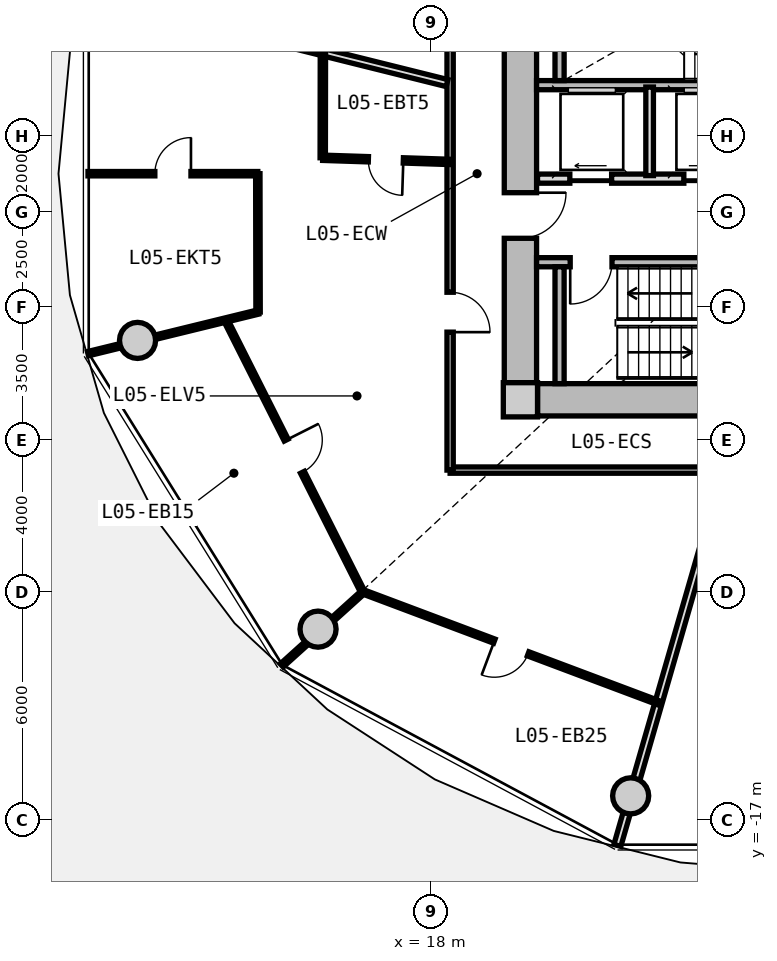
"""IFC4 building model, lengths in metres.
Left out: names, types, materials, properties, quantities, classifications, styles, units other than length and angle.
Written with IfcOpenShell. Run it as: python <this file> out.ifc"""

import sys

from ifc_helpers import new_model, si_unit, direction, frame, frame_2d, origin, origin_2d, place, context, subcontext, project, spatial, rectangle, circle, extrude, source, transform, mapped, element, fill, save


model = new_model("IFC4")
c1 = context("Model", 3, precision=1e-05, world=origin(), true_north=direction((0.0, 1.0)))
c2 = subcontext(c1, "Body", "Model", "MODEL_VIEW")
j1 = project(units=[si_unit("LENGTHUNIT", "METRE"), si_unit("PLANEANGLEUNIT", "RADIAN")], contexts=[c1])
p1 = place(None, origin())
s1 = spatial("IfcSite", under=j1, at=p1, CompositionType="ELEMENT")
p2 = place(p1, origin())
s2 = spatial("IfcBuilding", under=s1, at=p2, CompositionType="ELEMENT")
p3 = place(p2, frame((0.0, 0.0, 21.6)))
s3 = spatial("IfcBuildingStorey", under=s2, at=p3, CompositionType="ELEMENT", Elevation=21.6)
m1 = source(origin(), c2, "Body", "SweptSolid", [
    extrude(rectangle(XDim=0.9, YDim=0.9, at=origin_2d()), origin(), (0.0, 0.0, 1.0), 3.05),
])
p4 = place(p3, frame((20.35, -5.95, 0.0), z_axis=(0.0, 0.0, 1.0), x_axis=(1.0, 0.0, 0.0)))
e1 = element("IfcColumn", 1, at=p4, inside=s3, PredefinedType="COLUMN", context=c2, shape_type="MappedRepresentation", body=[
    mapped(m1, transform((0.0, 0.0, 0.0), x_axis=(1.0, 0.0, 0.0), y_axis=(0.0, 1.0, 0.0), z_axis=(0.0, 0.0, 1.0), scale=1.0)),
])
m2 = source(origin(), c2, "Body", "SweptSolid", [
    extrude(rectangle(XDim=14.4, YDim=0.85, at=frame_2d((7.2, 0.0))), origin(), (0.0, 0.0, 1.0), 2.79),
])
p5 = place(p3, frame((35.2, -5.95, 0.0), z_axis=(0.0, 0.0, 1.0), x_axis=(-1.0, 0.0, 0.0)))
e2 = element("IfcWall", 2, at=p5, inside=s3, PredefinedType="SHEAR", context=c2, shape_type="MappedRepresentation", body=[
    mapped(m2, transform((0.0, 0.0, 0.0), x_axis=(1.0, 0.0, 0.0), y_axis=(0.0, 1.0, 0.0), z_axis=(0.0, 0.0, 1.0), scale=1.0)),
])
m3 = source(origin(), c2, "Body", "SweptSolid", [
    extrude(rectangle(XDim=11.0, YDim=0.85, at=frame_2d((5.5, 0.0))), origin(), (0.0, 0.0, 1.0), 2.79),
])
p6 = place(p3, frame((20.35, -5.5, 0.0), z_axis=(0.0, 0.0, 1.0), x_axis=(0.0, 1.0, 0.0)))
e3 = element("IfcWall", 3, at=p6, inside=s3, PredefinedType="SHEAR", context=c2, shape_type="MappedRepresentation", body=[
    mapped(m3, transform((0.0, 0.0, 0.0), x_axis=(1.0, 0.0, 0.0), y_axis=(0.0, 1.0, 0.0), z_axis=(0.0, 0.0, 1.0), scale=1.0)),
])
p7 = place(p6, frame((3.8, 0.0, 0.0)))
e4 = element("IfcOpeningElement", 4, at=p7, cuts=e3, PredefinedType="OPENING", context=c2, shape_type="SweptSolid", body=[
    extrude(rectangle(XDim=1.2, YDim=2.15, at=frame_2d((0.6, 1.075))), frame((0.0, 0.435, 0.0), z_axis=(0.0, -1.0, 0.0), x_axis=(1.0, 0.0, 0.0)), (0.0, 0.0, 1.0), 0.87),
])
m4 = source(origin(), c2, "Body", "SweptSolid", [
    extrude(circle(Radius=0.475, at=origin_2d()), origin(), (0.0, 0.0, 1.0), 3.47),
])
for number, where, z_axis, x_axis in (
    (5, (10.275, -4.387, -0.42), (0.0, 0.0, 1.0), (1.0, 0.0, 0.0)),
    (6, (15.025, -11.985, -0.42), (0.0, 0.0, 1.0), (1.0, 0.0, 0.0)),
    (7, (23.251, -16.373, -0.42), (0.0, 0.0, 1.0), (1.0, 0.0, 0.0)),
):
    element("IfcColumn", number, at=place(p3, frame(where, z_axis=z_axis, x_axis=x_axis)), inside=s3, PredefinedType="COLUMN", context=c2, shape_type="MappedRepresentation", body=[
        mapped(m4, transform((0.0, 0.0, 0.0), x_axis=(1.0, 0.0, 0.0), y_axis=(0.0, 1.0, 0.0), z_axis=(0.0, 0.0, 1.0), scale=1.0)),
    ])
m5 = source(origin(), c2, "Body", "SweptSolid", [
    extrude(rectangle(XDim=7.765, YDim=0.24, at=frame_2d((3.883, 0.0))), origin(), (0.0, 0.0, 1.0), 2.79),
])
p8 = place(p3, frame((20.775, 2.33, 0.0), z_axis=(0.0, 0.0, 1.0), x_axis=(1.0, 0.0, 0.0)))
e8 = element("IfcWall", 8, at=p8, inside=s3, PredefinedType="PARTITIONING", context=c2, shape_type="MappedRepresentation", body=[
    mapped(m5, transform((0.0, 0.0, 0.0), x_axis=(1.0, 0.0, 0.0), y_axis=(0.0, 1.0, 0.0), z_axis=(0.0, 0.0, 1.0), scale=1.0)),
])
m6 = source(origin(), c2, "Body", "SweptSolid", [
    extrude(rectangle(XDim=3.075, YDim=0.24, at=frame_2d((1.538, 0.0))), origin(), (0.0, 0.0, 1.0), 2.79),
])
p9 = place(p3, frame((21.38, 2.45, 0.0), z_axis=(0.0, 0.0, 1.0), x_axis=(0.0, 1.0, 0.0)))
e9 = element("IfcWall", 9, at=p9, inside=s3, PredefinedType="PARTITIONING", context=c2, shape_type="MappedRepresentation", body=[
    mapped(m6, transform((0.0, 0.0, 0.0), x_axis=(1.0, 0.0, 0.0), y_axis=(0.0, 1.0, 0.0), z_axis=(0.0, 0.0, 1.0), scale=1.0)),
])
p10 = place(p3, frame((20.775, -2.33, 0.0), z_axis=(0.0, 0.0, 1.0), x_axis=(1.0, 0.0, 0.0)))
e10 = element("IfcWall", 10, at=p10, inside=s3, PredefinedType="PARTITIONING", context=c2, shape_type="MappedRepresentation", body=[
    mapped(m5, transform((0.0, 0.0, 0.0), x_axis=(1.0, 0.0, 0.0), y_axis=(0.0, 1.0, 0.0), z_axis=(0.0, 0.0, 1.0), scale=1.0)),
])
p11 = place(p10, frame((0.885, 0.0, 0.0)))
e11 = element("IfcOpeningElement", 11, at=p11, cuts=e10, PredefinedType="OPENING", context=c2, shape_type="SweptSolid", body=[
    extrude(rectangle(XDim=1.1, YDim=2.15, at=frame_2d((0.55, 1.075))), frame((0.0, 0.13, 0.0), z_axis=(0.0, -1.0, 0.0), x_axis=(1.0, 0.0, 0.0)), (0.0, 0.0, 1.0), 0.26),
])
p12 = place(p3, frame((21.38, -5.525, 0.0), z_axis=(0.0, 0.0, 1.0), x_axis=(0.0, 1.0, 0.0)))
e12 = element("IfcWall", 12, at=p12, inside=s3, PredefinedType="PARTITIONING", context=c2, shape_type="MappedRepresentation", body=[
    mapped(m6, transform((0.0, 0.0, 0.0), x_axis=(1.0, 0.0, 0.0), y_axis=(0.0, 1.0, 0.0), z_axis=(0.0, 0.0, 1.0), scale=1.0)),
])
m7 = source(origin(), c2, "Body", "SweptSolid", [
    extrude(rectangle(XDim=7.62, YDim=0.24, at=frame_2d((3.81, 0.0))), origin(), (0.0, 0.0, 1.0), 2.775),
])
p13 = place(p3, frame((20.8, -0.13, 0.0), z_axis=(0.0, 0.0, 1.0), x_axis=(1.0, 0.0, 0.0)))
e13 = element("IfcWall", 13, at=p13, inside=s3, PredefinedType="PARTITIONING", context=c2, shape_type="MappedRepresentation", body=[
    mapped(m7, transform((0.0, 0.0, 0.0), x_axis=(1.0, 0.0, 0.0), y_axis=(0.0, 1.0, 0.0), z_axis=(0.0, 0.0, 1.0), scale=1.0)),
])
p14 = place(p13, frame((6.22, 0.0, 0.0)))
e14 = element("IfcOpeningElement", 14, at=p14, cuts=e13, PredefinedType="OPENING", context=c2, shape_type="SweptSolid", body=[
    extrude(rectangle(XDim=1.0, YDim=2.1, at=frame_2d((0.5, 1.05))), frame((0.0, 0.13, 0.0), z_axis=(0.0, -1.0, 0.0), x_axis=(1.0, 0.0, 0.0)), (0.0, 0.0, 1.0), 0.26),
])
p15 = place(p13, frame((0.85, 0.0, 0.0)))
e15 = element("IfcOpeningElement", 15, at=p15, cuts=e13, PredefinedType="OPENING", context=c2, shape_type="SweptSolid", body=[
    extrude(rectangle(XDim=1.1, YDim=2.2, at=frame_2d((0.55, 1.1))), frame((0.0, 0.13, 0.0), z_axis=(0.0, -1.0, 0.0), x_axis=(1.0, 0.0, 0.0)), (0.0, 0.0, 1.0), 0.26),
])
p16 = place(p13, frame((3.85, 0.0, 0.0)))
e16 = element("IfcOpeningElement", 16, at=p16, cuts=e13, PredefinedType="OPENING", context=c2, shape_type="SweptSolid", body=[
    extrude(rectangle(XDim=1.1, YDim=2.2, at=frame_2d((0.55, 1.1))), frame((0.0, 0.13, 0.0), z_axis=(0.0, -1.0, 0.0), x_axis=(1.0, 0.0, 0.0)), (0.0, 0.0, 1.0), 0.26),
])
m8 = source(origin(), c2, "Body", "SweptSolid", [
    extrude(rectangle(XDim=2.33, YDim=0.2, at=frame_2d((1.165, 0.0))), origin(), (0.0, 0.0, 1.0), 2.775),
])
p17 = place(p3, frame((23.75, -0.05, 0.0), z_axis=(0.0, 0.0, 1.0), x_axis=(0.0, 1.0, 0.0)))
e17 = element("IfcWall", 17, at=p17, inside=s3, PredefinedType="PARTITIONING", context=c2, shape_type="MappedRepresentation", body=[
    mapped(m8, transform((0.0, 0.0, 0.0), x_axis=(1.0, 0.0, 0.0), y_axis=(0.0, 1.0, 0.0), z_axis=(0.0, 0.0, 1.0), scale=1.0)),
])
m9 = source(origin(), c2, "Body", "SweptSolid", [
    extrude(rectangle(XDim=19.0, YDim=0.165, at=frame_2d((9.5, 0.0))), origin(), (0.0, 0.0, 1.0), 2.775),
])
p18 = place(p3, frame((37.5, -7.8, 0.0), z_axis=(0.0, 0.0, 1.0), x_axis=(-1.0, 0.0, 0.0)))
e18 = element("IfcWall", 18, at=p18, inside=s3, PredefinedType="PARTITIONING", context=c2, shape_type="MappedRepresentation", body=[
    mapped(m9, transform((0.0, 0.0, 0.0), x_axis=(1.0, 0.0, 0.0), y_axis=(0.0, 1.0, 0.0), z_axis=(0.0, 0.0, 1.0), scale=1.0)),
])
p19 = place(p18, frame((8.875, 0.0, 0.0)))
e19 = element("IfcOpeningElement", 19, at=p19, cuts=e18, PredefinedType="OPENING", context=c2, shape_type="SweptSolid", body=[
    extrude(rectangle(XDim=1.25, YDim=2.2, at=frame_2d((0.625, 1.1))), frame((0.0, 0.093, 0.0), z_axis=(0.0, -1.0, 0.0), x_axis=(1.0, 0.0, 0.0)), (0.0, 0.0, 1.0), 0.185),
])
p20 = place(p18, frame((5.915, 0.0, 0.0)))
e20 = element("IfcOpeningElement", 20, at=p20, cuts=e18, PredefinedType="OPENING", context=c2, shape_type="SweptSolid", body=[
    extrude(rectangle(XDim=0.92, YDim=2.1, at=frame_2d((0.46, 1.05))), frame((0.0, 0.093, 0.0), z_axis=(0.0, -1.0, 0.0), x_axis=(1.0, 0.0, 0.0)), (0.0, 0.0, 1.0), 0.185),
])
p21 = place(p18, frame((2.769, 0.0, 0.0)))
e21 = element("IfcOpeningElement", 21, at=p21, cuts=e18, PredefinedType="OPENING", context=c2, shape_type="SweptSolid", body=[
    extrude(rectangle(XDim=0.92, YDim=2.1, at=frame_2d((0.46, 1.05))), frame((0.0, 0.093, 0.0), z_axis=(0.0, -1.0, 0.0), x_axis=(1.0, 0.0, 0.0)), (0.0, 0.0, 1.0), 0.185),
])
m10 = source(origin(), c2, "Body", "SweptSolid", [
    extrude(rectangle(XDim=15.6, YDim=0.165, at=frame_2d((7.8, 0.0))), origin(), (0.0, 0.0, 1.0), 2.775),
])
p22 = place(p3, frame((18.5, -7.8, 0.0), z_axis=(0.0, 0.0, 1.0), x_axis=(0.0, 1.0, 0.0)))
e22 = element("IfcWall", 22, at=p22, inside=s3, PredefinedType="PARTITIONING", context=c2, shape_type="MappedRepresentation", body=[
    mapped(m10, transform((0.0, 0.0, 0.0), x_axis=(1.0, 0.0, 0.0), y_axis=(0.0, 1.0, 0.0), z_axis=(0.0, 0.0, 1.0), scale=1.0)),
])
p23 = place(p22, frame((12.241, 0.0, 0.0)))
e23 = element("IfcOpeningElement", 23, at=p23, cuts=e22, PredefinedType="OPENING", context=c2, shape_type="SweptSolid", body=[
    extrude(rectangle(XDim=1.05, YDim=2.15, at=frame_2d((0.525, 1.075))), frame((0.0, 0.093, 0.0), z_axis=(0.0, -1.0, 0.0), x_axis=(1.0, 0.0, 0.0)), (0.0, 0.0, 1.0), 0.185),
])
p24 = place(p22, frame((3.63, 0.0, 0.0)))
e24 = element("IfcOpeningElement", 24, at=p24, cuts=e22, PredefinedType="OPENING", context=c2, shape_type="SweptSolid", body=[
    extrude(rectangle(XDim=1.05, YDim=2.15, at=frame_2d((0.525, 1.075))), frame((0.0, 0.093, 0.0), z_axis=(0.0, -1.0, 0.0), x_axis=(1.0, 0.0, 0.0)), (0.0, 0.0, 1.0), 0.185),
])
m11 = source(origin(), c2, "Body", "SweptSolid", [
    extrude(rectangle(XDim=9.737, YDim=0.19, at=frame_2d((4.869, 0.0))), origin(), (0.0, 0.0, 1.0), 2.225),
])
p25 = place(p3, frame((18.42, 2.385, 0.0), z_axis=(0.0, 0.0, 1.0), x_axis=(-0.970392716238, 0.241532557375, 0.0)))
e25 = element("IfcWall", 25, at=p25, inside=s3, PredefinedType="PARTITIONING", context=c2, shape_type="MappedRepresentation", body=[
    mapped(m11, transform((0.0, 0.0, 0.0), x_axis=(1.0, 0.0, 0.0), y_axis=(0.0, 1.0, 0.0), z_axis=(0.0, 0.0, 1.0), scale=1.0)),
])
m12 = source(origin(), c2, "Body", "SweptSolid", [
    extrude(rectangle(XDim=10.196, YDim=0.19, at=frame_2d((5.098, 0.0))), origin(), (0.0, 0.0, 1.0), 2.225),
])
p26 = place(p3, frame((25.727, -7.88, 0.0), z_axis=(0.0, 0.0, 1.0), x_axis=(-0.277136420347, -0.960830580549, 0.0)))
e26 = element("IfcWall", 26, at=p26, inside=s3, PredefinedType="PARTITIONING", context=c2, shape_type="MappedRepresentation", body=[
    mapped(m12, transform((0.0, 0.0, 0.0), x_axis=(1.0, 0.0, 0.0), y_axis=(0.0, 1.0, 0.0), z_axis=(0.0, 0.0, 1.0), scale=1.0)),
])
m13 = source(origin(), c2, "Body", "SweptSolid", [
    extrude(rectangle(XDim=8.018, YDim=0.115, at=frame_2d((4.009, 0.0))), origin(), (0.0, 0.0, 1.0), 2.775),
])
p27 = place(p3, frame((12.596, -3.854, 0.0), z_axis=(0.0, 0.0, 1.0), x_axis=(0.450134355233, -0.89296084026, 0.0)))
e27 = element("IfcWall", 27, at=p27, inside=s3, PredefinedType="PARTITIONING", context=c2, shape_type="MappedRepresentation", body=[
    mapped(m13, transform((0.0, 0.0, 0.0), x_axis=(1.0, 0.0, 0.0), y_axis=(0.0, 1.0, 0.0), z_axis=(0.0, 0.0, 1.0), scale=1.0)),
])
p28 = place(p27, frame((3.534, 0.0, 0.0)))
e28 = element("IfcOpeningElement", 28, at=p28, cuts=e27, PredefinedType="OPENING", context=c2, shape_type="SweptSolid", body=[
    extrude(rectangle(XDim=0.95, YDim=2.1, at=frame_2d((0.475, 1.05))), frame((0.0, 0.067, 0.0), z_axis=(0.0, -1.0, 0.0), x_axis=(1.0, 0.0, 0.0)), (0.0, 0.0, 1.0), 0.135),
])
m14 = source(origin(), c2, "Body", "SweptSolid", [
    extrude(rectangle(XDim=4.609, YDim=0.115, at=frame_2d((2.305, 0.0))), origin(), (0.0, 0.0, 1.0), 2.225),
])
p29 = place(p3, frame((13.448, -3.641, 0.0), z_axis=(0.0, 0.0, 1.0), x_axis=(-0.971345494518, -0.237671896276, 0.0)))
e29 = element("IfcWall", 29, at=p29, inside=s3, PredefinedType="PARTITIONING", context=c2, shape_type="MappedRepresentation", body=[
    mapped(m14, transform((0.0, 0.0, 0.0), x_axis=(1.0, 0.0, 0.0), y_axis=(0.0, 1.0, 0.0), z_axis=(0.0, 0.0, 1.0), scale=1.0)),
])
m15 = source(origin(), c2, "Body", "SweptSolid", [
    extrude(rectangle(XDim=8.32, YDim=0.115, at=frame_2d((4.16, 0.0))), origin(), (0.0, 0.0, 1.0), 2.775),
])
p30 = place(p3, frame((16.214, -11.006, 0.0), z_axis=(0.0, 0.0, 1.0), x_axis=(0.936180763098, -0.351518959382, 0.0)))
e30 = element("IfcWall", 30, at=p30, inside=s3, PredefinedType="PARTITIONING", context=c2, shape_type="MappedRepresentation", body=[
    mapped(m15, transform((0.0, 0.0, 0.0), x_axis=(1.0, 0.0, 0.0), y_axis=(0.0, 1.0, 0.0), z_axis=(0.0, 0.0, 1.0), scale=1.0)),
])
p31 = place(p30, frame((3.685, 0.0, 0.0)))
e31 = element("IfcOpeningElement", 31, at=p31, cuts=e30, PredefinedType="OPENING", context=c2, shape_type="SweptSolid", body=[
    extrude(rectangle(XDim=0.95, YDim=2.1, at=frame_2d((0.475, 1.05))), frame((0.0, 0.067, 0.0), z_axis=(0.0, -1.0, 0.0), x_axis=(1.0, 0.0, 0.0)), (0.0, 0.0, 1.0), 0.135),
])
m16 = source(origin(), c2, "Body", "SweptSolid", [
    extrude(rectangle(XDim=2.887, YDim=0.115, at=frame_2d((1.444, 0.0))), origin(), (0.0, 0.0, 1.0), 2.225),
])
p32 = place(p3, frame((16.214, -11.006, 0.0), z_axis=(0.0, 0.0, 1.0), x_axis=(-0.742448503307, -0.669903142205, 0.0)))
e32 = element("IfcWall", 32, at=p32, inside=s3, PredefinedType="PARTITIONING", context=c2, shape_type="MappedRepresentation", body=[
    mapped(m16, transform((0.0, 0.0, 0.0), x_axis=(1.0, 0.0, 0.0), y_axis=(0.0, 1.0, 0.0), z_axis=(0.0, 0.0, 1.0), scale=1.0)),
])
m17 = source(origin(), c2, "Body", "SweptSolid", [
    extrude(rectangle(XDim=3.323, YDim=0.14, at=frame_2d((1.662, 0.0))), origin(), (0.0, 0.0, 1.0), 2.775),
])
p33 = place(p3, frame((18.47, 0.311, 0.0), z_axis=(0.0, 0.0, 1.0), x_axis=(-0.999467979553, 0.032615300817, 0.0)))
e33 = element("IfcWall", 33, at=p33, inside=s3, PredefinedType="PARTITIONING", context=c2, shape_type="MappedRepresentation", body=[
    mapped(m17, transform((0.0, 0.0, 0.0), x_axis=(1.0, 0.0, 0.0), y_axis=(0.0, 1.0, 0.0), z_axis=(0.0, 0.0, 1.0), scale=1.0)),
])
p34 = place(p33, frame((1.202, 0.0, 0.0)))
e34 = element("IfcOpeningElement", 34, at=p34, cuts=e33, PredefinedType="OPENING", context=c2, shape_type="SweptSolid", body=[
    extrude(rectangle(XDim=0.92, YDim=2.1, at=frame_2d((0.46, 1.05))), frame((0.0, 0.08, 0.0), z_axis=(0.0, -1.0, 0.0), x_axis=(1.0, 0.0, 0.0)), (0.0, 0.0, 1.0), 0.16),
])
m18 = source(origin(), c2, "Body", "SweptSolid", [
    extrude(rectangle(XDim=2.795, YDim=0.14, at=frame_2d((1.397, 0.0))), origin(), (0.0, 0.0, 1.0), 2.775),
])
p35 = place(p3, frame((15.148, 0.419, 0.0), z_axis=(0.0, 0.0, 1.0), x_axis=(0.001659531299, 0.999998622977, 0.0)))
e35 = element("IfcWall", 35, at=p35, inside=s3, PredefinedType="PARTITIONING", context=c2, shape_type="MappedRepresentation", body=[
    mapped(m18, transform((0.0, 0.0, 0.0), x_axis=(1.0, 0.0, 0.0), y_axis=(0.0, 1.0, 0.0), z_axis=(0.0, 0.0, 1.0), scale=1.0)),
])
m19 = source(origin(), c2, "Body", "SweptSolid", [
    extrude(rectangle(XDim=4.469, YDim=0.115, at=frame_2d((2.234, 0.0))), origin(), (0.0, 0.0, 1.0), 2.775),
])
p36 = place(p3, frame((13.44, 0.0, 0.0), z_axis=(0.0, 0.0, 1.0), x_axis=(-1.0, 0.0, 0.0)))
e36 = element("IfcWall", 36, at=p36, inside=s3, PredefinedType="PARTITIONING", context=c2, shape_type="MappedRepresentation", body=[
    mapped(m19, transform((0.0, 0.0, 0.0), x_axis=(1.0, 0.0, 0.0), y_axis=(0.0, 1.0, 0.0), z_axis=(0.0, 0.0, 1.0), scale=1.0)),
])
p37 = place(p36, frame((1.759, 0.0, 0.0)))
e37 = element("IfcOpeningElement", 37, at=p37, cuts=e36, PredefinedType="OPENING", context=c2, shape_type="SweptSolid", body=[
    extrude(rectangle(XDim=0.95, YDim=2.1, at=frame_2d((0.475, 1.05))), frame((0.0, 0.067, 0.0), z_axis=(0.0, -1.0, 0.0), x_axis=(1.0, 0.0, 0.0)), (0.0, 0.0, 1.0), 0.135),
])
m20 = source(origin(), c2, "Body", "SweptSolid", [
    extrude(rectangle(XDim=3.641, YDim=0.115, at=frame_2d((1.821, 0.0))), origin(), (0.0, 0.0, 1.0), 2.775),
])
p38 = place(p3, frame((13.44, 0.0, 0.0), z_axis=(0.0, 0.0, 1.0), x_axis=(0.001877301419, -0.999998237868, 0.0)))
e38 = element("IfcWall", 38, at=p38, inside=s3, PredefinedType="PARTITIONING", context=c2, shape_type="MappedRepresentation", body=[
    mapped(m20, transform((0.0, 0.0, 0.0), x_axis=(1.0, 0.0, 0.0), y_axis=(0.0, 1.0, 0.0), z_axis=(0.0, 0.0, 1.0), scale=1.0)),
])
m21 = source(origin(), c2, "Body", "SweptSolid", [
    extrude(rectangle(XDim=1.1, YDim=2.15, at=frame_2d((0.55, 1.075))), frame((0.0, 0.025, 0.0), z_axis=(0.0, -1.0, 0.0), x_axis=(1.0, 0.0, 0.0)), (0.0, 0.0, 1.0), 0.05),
])
p39 = place(p11, frame((1.1, 0.0, 0.0), z_axis=(0.0, 0.0, 1.0), x_axis=(-1.0, 0.0, 0.0)))
e39 = element("IfcDoor", 39, at=p39, inside=s3, OperationType="SINGLE_SWING_RIGHT", PredefinedType="DOOR", context=c2, shape_type="MappedRepresentation", body=[
    mapped(m21, transform((0.0, 0.0, 0.0), x_axis=(1.0, 0.0, 0.0), y_axis=(0.0, 1.0, 0.0), z_axis=(0.0, 0.0, 1.0), scale=1.0)),
])
fill(e11, e39)
m22 = source(origin(), c2, "Body", "SweptSolid", [
    extrude(rectangle(XDim=1.2, YDim=2.15, at=frame_2d((0.6, 1.075))), frame((0.0, 0.025, 0.0), z_axis=(0.0, -1.0, 0.0), x_axis=(1.0, 0.0, 0.0)), (0.0, 0.0, 1.0), 0.05),
])
p40 = place(p7, frame((1.2, 0.0, 0.0), z_axis=(0.0, 0.0, 1.0), x_axis=(-1.0, 0.0, 0.0)))
e40 = element("IfcDoor", 40, at=p40, inside=s3, OperationType="SINGLE_SWING_LEFT", PredefinedType="DOOR", context=c2, shape_type="MappedRepresentation", body=[
    mapped(m22, transform((0.0, 0.0, 0.0), x_axis=(1.0, 0.0, 0.0), y_axis=(0.0, 1.0, 0.0), z_axis=(0.0, 0.0, 1.0), scale=1.0)),
])
fill(e4, e40)
m23 = source(origin(), c2, "Body", "SweptSolid", [
    extrude(rectangle(XDim=1.1, YDim=2.2, at=frame_2d((0.55, 1.1))), frame((0.0, 0.025, 0.0), z_axis=(0.0, -1.0, 0.0), x_axis=(1.0, 0.0, 0.0)), (0.0, 0.0, 1.0), 0.05),
])
p41 = place(p15, origin())
e41 = element("IfcDoor", 41, at=p41, inside=s3, OperationType="SLIDING_TO_LEFT", PredefinedType="DOOR", context=c2, shape_type="MappedRepresentation", body=[
    mapped(m23, transform((0.0, 0.0, 0.0), x_axis=(1.0, 0.0, 0.0), y_axis=(0.0, 1.0, 0.0), z_axis=(0.0, 0.0, 1.0), scale=1.0)),
])
fill(e15, e41)
p42 = place(p16, origin())
e42 = element("IfcDoor", 42, at=p42, inside=s3, OperationType="SLIDING_TO_RIGHT", PredefinedType="DOOR", context=c2, shape_type="MappedRepresentation", body=[
    mapped(m23, transform((0.0, 0.0, 0.0), x_axis=(1.0, 0.0, 0.0), y_axis=(0.0, 1.0, 0.0), z_axis=(0.0, 0.0, 1.0), scale=1.0)),
])
fill(e16, e42)
m24 = source(origin(), c2, "Body", "SweptSolid", [
    extrude(rectangle(XDim=1.05, YDim=2.15, at=frame_2d((0.525, 1.075))), frame((0.0, 0.025, 0.0), z_axis=(0.0, -1.0, 0.0), x_axis=(1.0, 0.0, 0.0)), (0.0, 0.0, 1.0), 0.05),
])
p43 = place(p24, frame((1.05, 0.0, 0.0), z_axis=(0.0, 0.0, 1.0), x_axis=(-1.0, 0.0, 0.0)))
e43 = element("IfcDoor", 43, at=p43, inside=s3, OperationType="SINGLE_SWING_RIGHT", PredefinedType="DOOR", context=c2, shape_type="MappedRepresentation", body=[
    mapped(m24, transform((0.0, 0.0, 0.0), x_axis=(1.0, 0.0, 0.0), y_axis=(0.0, 1.0, 0.0), z_axis=(0.0, 0.0, 1.0), scale=1.0)),
])
fill(e24, e43)
m25 = source(origin(), c2, "Body", "SweptSolid", [
    extrude(rectangle(XDim=0.92, YDim=2.1, at=frame_2d((0.46, 1.05))), frame((0.0, 0.025, 0.0), z_axis=(0.0, -1.0, 0.0), x_axis=(1.0, 0.0, 0.0)), (0.0, 0.0, 1.0), 0.05),
])
p44 = place(p34, origin())
e44 = element("IfcDoor", 44, at=p44, inside=s3, OperationType="SINGLE_SWING_LEFT", PredefinedType="DOOR", context=c2, shape_type="MappedRepresentation", body=[
    mapped(m25, transform((0.0, 0.0, 0.0), x_axis=(1.0, 0.0, 0.0), y_axis=(0.0, 1.0, 0.0), z_axis=(0.0, 0.0, 1.0), scale=1.0)),
])
fill(e34, e44)
m26 = source(origin(), c2, "Body", "SweptSolid", [
    extrude(rectangle(XDim=0.95, YDim=2.1, at=frame_2d((0.475, 1.05))), frame((0.0, 0.025, 0.0), z_axis=(0.0, -1.0, 0.0), x_axis=(1.0, 0.0, 0.0)), (0.0, 0.0, 1.0), 0.05),
])
p45 = place(p37, frame((0.95, 0.0, 0.0), z_axis=(0.0, 0.0, 1.0), x_axis=(-1.0, 0.0, 0.0)))
e45 = element("IfcDoor", 45, at=p45, inside=s3, OperationType="SINGLE_SWING_RIGHT", PredefinedType="DOOR", context=c2, shape_type="MappedRepresentation", body=[
    mapped(m26, transform((0.0, 0.0, 0.0), x_axis=(1.0, 0.0, 0.0), y_axis=(0.0, 1.0, 0.0), z_axis=(0.0, 0.0, 1.0), scale=1.0)),
])
fill(e37, e45)
p46 = place(p28, origin())
e46 = element("IfcDoor", 46, at=p46, inside=s3, OperationType="SINGLE_SWING_LEFT", PredefinedType="DOOR", context=c2, shape_type="MappedRepresentation", body=[
    mapped(m26, transform((0.0, 0.0, 0.0), x_axis=(1.0, 0.0, 0.0), y_axis=(0.0, 1.0, 0.0), z_axis=(0.0, 0.0, 1.0), scale=1.0)),
])
fill(e28, e46)
p47 = place(p31, frame((0.95, 0.0, 0.0), z_axis=(0.0, 0.0, 1.0), x_axis=(-1.0, 0.0, 0.0)))
e47 = element("IfcDoor", 47, at=p47, inside=s3, OperationType="SINGLE_SWING_RIGHT", PredefinedType="DOOR", context=c2, shape_type="MappedRepresentation", body=[
    mapped(m26, transform((0.0, 0.0, 0.0), x_axis=(1.0, 0.0, 0.0), y_axis=(0.0, 1.0, 0.0), z_axis=(0.0, 0.0, 1.0), scale=1.0)),
])
fill(e31, e47)
save(model, sys.argv[1])
